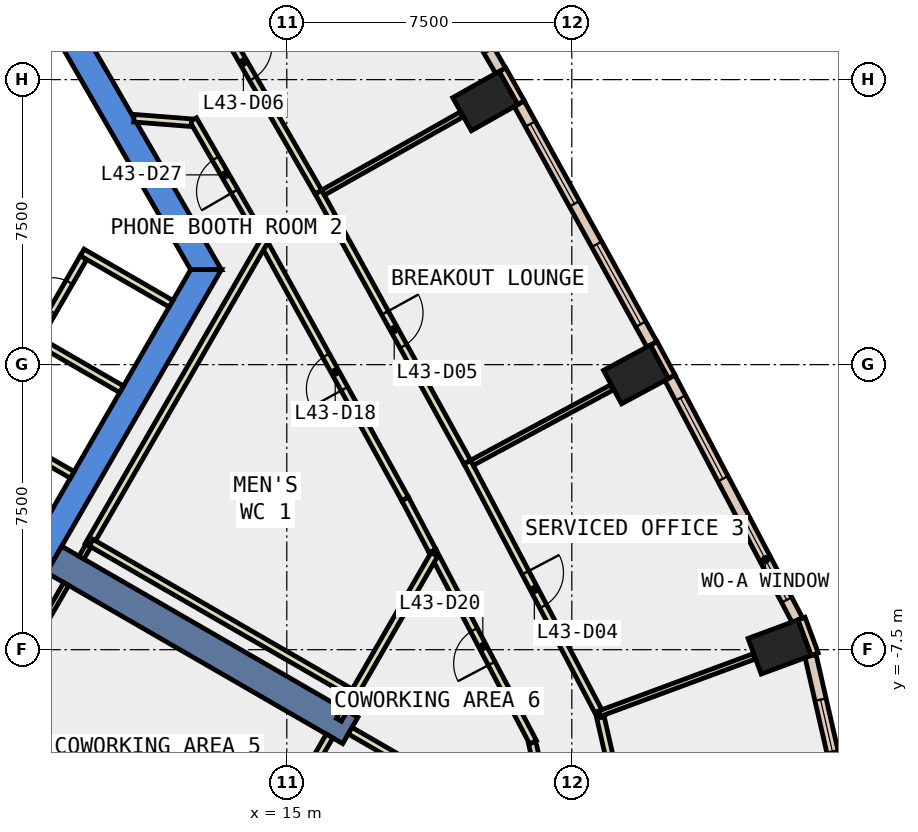
"""IFC4 building model, lengths in metres.
Left out: names, types, materials, properties, quantities, classifications, styles, units other than length and angle.
Written with IfcOpenShell. Run it as: python <this file> out.ifc"""

import sys

from ifc_helpers import new_model, si_unit, direction, frame, frame_2d, origin, origin_2d, place, context, subcontext, project, spatial, polyline, rectangle, outline, extrude, element, fill, save


model = new_model("IFC4")
c1 = context("Model", 3, precision=1e-05, world=origin(), true_north=direction((0.0, 1.0)))
c2 = subcontext(c1, "Body", "Model", "MODEL_VIEW")
j1 = project(units=[si_unit("LENGTHUNIT", "METRE"), si_unit("PLANEANGLEUNIT", "RADIAN")], contexts=[c1])
p1 = place(None, origin())
s1 = spatial("IfcSite", under=j1, at=p1, CompositionType="ELEMENT")
p2 = place(p1, origin())
s2 = spatial("IfcBuilding", under=s1, at=p2, CompositionType="ELEMENT")
p3 = place(p2, frame((0.0, 0.0, 194.0)))
s3 = spatial("IfcBuildingStorey", under=s2, at=p3, CompositionType="ELEMENT", Elevation=194.0)
for number, where, z_axis, x_axis in (
    (1, (27.967, -7.429, -0.4), (0.0, 0.0, 1.0), (-0.347, 0.938, 0.0)),
    (2, (24.188, -0.259, -0.4), (0.0, 0.0, 1.0), (-0.474, 0.88, 0.0)),
    (3, (20.222, 6.934, -0.4), (0.0, 0.0, 1.0), (-0.491, 0.871, 0.0)),
):
    element("IfcColumn", number, at=place(p3, frame(where, z_axis=z_axis, x_axis=x_axis)), inside=s3, PredefinedType="COLUMN", context=c2, shape_type="SweptSolid", body=[
        extrude(rectangle(XDim=1.0, YDim=1.4, at=origin_2d()), origin(), (0.0, 0.0, 1.0), 4.2),
    ])
p4 = place(p3, frame((0.0, 0.0, -0.4)))
e4 = element("IfcWall", 4, at=p4, inside=s3, PredefinedType="SHEAR", context=c2, shape_type="SweptSolid", body=[
    extrude(outline(polyline([(8.084, 11.498), (7.478, 11.148), (12.471, 2.5), (13.279, 2.5), (8.084, 11.498)])), origin(), (0.0, 0.0, 1.0), 4.2),
])
p5 = place(p3, frame((0.0, 0.0, -0.4)))
e5 = element("IfcWall", 5, at=p5, inside=s3, PredefinedType="SHEAR", context=c2, shape_type="SweptSolid", body=[
    extrude(outline(polyline([(6.64, -9.0), (13.279, 2.5), (12.471, 2.5), (6.235, -8.3), (6.64, -9.0)])), origin(), (0.0, 0.0, 1.0), 4.2),
])
p6 = place(p3, frame((8.877, -5.125, -0.4), z_axis=(0.0, 0.0, 1.0), x_axis=(0.866017533419, -0.500013631625, 0.0)))
e6 = element("IfcWall", 6, at=p6, inside=s3, PredefinedType="SHEAR", context=c2, shape_type="SweptSolid", body=[
    extrude(rectangle(XDim=9.0, YDim=0.8, at=frame_2d((4.5, 0.0))), origin(), (0.0, 0.0, 1.0), 4.2),
])
p7 = place(p3, frame((28.891, -7.621, 0.0), z_axis=(0.0, 0.0, 1.0), x_axis=(-0.347107644204, 0.937825294677, 0.0)))
e7 = element("IfcWall", 7, at=p7, inside=s3, PredefinedType="STANDARD", context=c2, shape_type="SweptSolid", body=[
    extrude(rectangle(XDim=1.0, YDim=0.2, at=frame_2d((0.5, 0.0))), origin(), (0.0, 0.0, 1.0), 3.8),
])
p8 = place(p3, frame((25.129, -0.32, 0.0), z_axis=(0.0, 0.0, 1.0), x_axis=(-0.473663196434, 0.88070606694, 0.0)))
e8 = element("IfcWall", 8, at=p8, inside=s3, PredefinedType="STANDARD", context=c2, shape_type="SweptSolid", body=[
    extrude(rectangle(XDim=1.0, YDim=0.2, at=frame_2d((0.5, 0.0))), origin(), (0.0, 0.0, 1.0), 3.8),
])
p9 = place(p3, frame((21.165, 6.891, 0.0), z_axis=(0.0, 0.0, 1.0), x_axis=(-0.491848119507, 0.870681013539, 0.0)))
e9 = element("IfcWall", 9, at=p9, inside=s3, PredefinedType="STANDARD", context=c2, shape_type="SweptSolid", body=[
    extrude(rectangle(XDim=1.0, YDim=0.2, at=frame_2d((0.5, 0.0))), origin(), (0.0, 0.0, 1.0), 3.8),
])
p10 = place(p3, frame((29.621, -11.332, 0.0), z_axis=(0.0, 0.0, 1.0), x_axis=(-0.223013094864, 0.974815448954, 0.0)))
e10 = element("IfcWall", 10, at=p10, inside=s3, PredefinedType="STANDARD", context=c2, shape_type="SweptSolid", body=[
    extrude(rectangle(XDim=3.767, YDim=0.3, at=frame_2d((1.884, 0.0))), origin(), (0.0, 0.0, 1.0), 3.8),
])
p11 = place(p10, frame((1.183, 0.0, 0.9)))
e11 = element("IfcOpeningElement", 11, at=p11, cuts=e10, PredefinedType="OPENING", context=c2, shape_type="SweptSolid", body=[
    extrude(rectangle(XDim=1.4, YDim=2.6, at=frame_2d((0.7, 1.3))), frame((0.0, 0.16, 0.0), z_axis=(0.0, -1.0, 0.0), x_axis=(1.0, 0.0, 0.0)), (0.0, 0.0, 1.0), 0.32),
])
p12 = place(p3, frame((28.435, -6.724, 0.0), z_axis=(0.0, 0.0, 1.0), x_axis=(-0.465478369088, 0.885059256723, 0.0)))
e12 = element("IfcWall", 12, at=p12, inside=s3, PredefinedType="STANDARD", context=c2, shape_type="SweptSolid", body=[
    extrude(rectangle(XDim=7.208, YDim=0.3, at=frame_2d((3.604, 0.0))), origin(), (0.0, 0.0, 1.0), 3.8),
])
p13 = place(p12, frame((0.602, 0.0, 0.9)))
e13 = element("IfcOpeningElement", 13, at=p13, cuts=e12, PredefinedType="OPENING", context=c2, shape_type="SweptSolid", body=[
    extrude(rectangle(XDim=2.4, YDim=2.6, at=frame_2d((1.2, 1.3))), frame((0.0, 0.16, 0.0), z_axis=(0.0, -1.0, 0.0), x_axis=(1.0, 0.0, 0.0)), (0.0, 0.0, 1.0), 0.32),
])
p14 = place(p12, frame((4.206, 0.0, 0.9)))
e14 = element("IfcOpeningElement", 14, at=p14, cuts=e12, PredefinedType="OPENING", context=c2, shape_type="SweptSolid", body=[
    extrude(rectangle(XDim=2.4, YDim=2.6, at=frame_2d((1.2, 1.3))), frame((0.0, 0.16, 0.0), z_axis=(0.0, -1.0, 0.0), x_axis=(1.0, 0.0, 0.0)), (0.0, 0.0, 1.0), 0.32),
])
p15 = place(p3, frame((24.607, 0.534, 0.0), z_axis=(0.0, 0.0, 1.0), x_axis=(-0.482862185961, 0.875696356832, 0.0)))
e15 = element("IfcWall", 15, at=p15, inside=s3, PredefinedType="STANDARD", context=c2, shape_type="SweptSolid", body=[
    extrude(rectangle(XDim=7.23, YDim=0.3, at=frame_2d((3.615, 0.0))), origin(), (0.0, 0.0, 1.0), 3.8),
])
p16 = place(p15, frame((0.607, 0.0, 0.9)))
e16 = element("IfcOpeningElement", 16, at=p16, cuts=e15, PredefinedType="OPENING", context=c2, shape_type="SweptSolid", body=[
    extrude(rectangle(XDim=2.4, YDim=2.6, at=frame_2d((1.2, 1.3))), frame((0.0, 0.16, 0.0), z_axis=(0.0, -1.0, 0.0), x_axis=(1.0, 0.0, 0.0)), (0.0, 0.0, 1.0), 0.32),
])
p17 = place(p15, frame((4.222, 0.0, 0.9)))
e17 = element("IfcOpeningElement", 17, at=p17, cuts=e15, PredefinedType="OPENING", context=c2, shape_type="SweptSolid", body=[
    extrude(rectangle(XDim=2.4, YDim=2.6, at=frame_2d((1.2, 1.3))), frame((0.0, 0.16, 0.0), z_axis=(0.0, -1.0, 0.0), x_axis=(1.0, 0.0, 0.0)), (0.0, 0.0, 1.0), 0.32),
])
p18 = place(p3, frame((20.626, 7.734, 0.0), z_axis=(0.0, 0.0, 1.0), x_axis=(-0.499948481376, 0.866055146033, 0.0)))
e18 = element("IfcWall", 18, at=p18, inside=s3, PredefinedType="STANDARD", context=c2, shape_type="SweptSolid", body=[
    extrude(rectangle(XDim=7.231, YDim=0.3, at=frame_2d((3.615, 0.0))), origin(), (0.0, 0.0, 1.0), 3.8),
])
p19 = place(p18, frame((0.608, 0.0, 0.9)))
e19 = element("IfcOpeningElement", 19, at=p19, cuts=e18, PredefinedType="OPENING", context=c2, shape_type="SweptSolid", body=[
    extrude(rectangle(XDim=2.4, YDim=2.6, at=frame_2d((1.2, 1.3))), frame((0.0, 0.16, 0.0), z_axis=(0.0, -1.0, 0.0), x_axis=(1.0, 0.0, 0.0)), (0.0, 0.0, 1.0), 0.32),
])
p20 = place(p18, frame((4.223, 0.0, 0.9)))
e20 = element("IfcOpeningElement", 20, at=p20, cuts=e18, PredefinedType="OPENING", context=c2, shape_type="SweptSolid", body=[
    extrude(rectangle(XDim=2.4, YDim=2.6, at=frame_2d((1.2, 1.3))), frame((0.0, 0.16, 0.0), z_axis=(0.0, -1.0, 0.0), x_axis=(1.0, 0.0, 0.0)), (0.0, 0.0, 1.0), 0.32),
])
p21 = place(p3, frame((14.213, 3.543, 0.0), z_axis=(0.0, 0.0, 1.0), x_axis=(-0.500182898346, 0.865919781621, 0.0)))
e21 = element("IfcWall", 21, at=p21, inside=s3, PredefinedType="PARTITIONING", context=c2, shape_type="SweptSolid", body=[
    extrude(rectangle(XDim=3.35, YDim=0.2, at=frame_2d((1.675, 0.0))), origin(), (0.0, 0.0, 1.0), 3.8),
])
p22 = place(p21, frame((1.175, 0.0, 0.0)))
e22 = element("IfcOpeningElement", 22, at=p22, cuts=e21, PredefinedType="OPENING", context=c2, shape_type="SweptSolid", body=[
    extrude(rectangle(XDim=1.0, YDim=2.1, at=frame_2d((0.5, 1.05))), frame((0.0, 0.11, 0.0), z_axis=(0.0, -1.0, 0.0), x_axis=(1.0, 0.0, 0.0)), (0.0, 0.0, 1.0), 0.22),
])
p23 = place(p3, frame((12.488, 6.366, 0.0), z_axis=(0.0, 0.0, 1.0), x_axis=(-0.996960771308, 0.077905201835, 0.0)))
e23 = element("IfcWall", 23, at=p23, inside=s3, PredefinedType="PARTITIONING", context=c2, shape_type="SweptSolid", body=[
    extrude(rectangle(XDim=1.514, YDim=0.2, at=frame_2d((0.757, 0.0))), origin(), (0.0, 0.0, 1.0), 3.8),
])
p24 = place(p3, frame((18.836, -4.906, 0.0), z_axis=(0.0, 0.0, 1.0), x_axis=(-0.465843561357, 0.884867095299, 0.0)))
e24 = element("IfcWall", 24, at=p24, inside=s3, PredefinedType="PARTITIONING", context=c2, shape_type="SweptSolid", body=[
    extrude(rectangle(XDim=1.554, YDim=0.2, at=frame_2d((0.777, 0.0))), origin(), (0.0, 0.0, 1.0), 3.8),
])
p25 = place(p3, frame((18.112, -3.531, 0.0), z_axis=(0.0, 0.0, 1.0), x_axis=(-0.482800061144, 0.875730609811, 0.0)))
e25 = element("IfcWall", 25, at=p25, inside=s3, PredefinedType="PARTITIONING", context=c2, shape_type="SweptSolid", body=[
    extrude(rectangle(XDim=7.612, YDim=0.2, at=frame_2d((3.806, 0.0))), origin(), (0.0, 0.0, 1.0), 3.8),
])
p26 = place(p25, frame((3.306, 0.0, 0.0)))
e26 = element("IfcOpeningElement", 26, at=p26, cuts=e25, PredefinedType="OPENING", context=c2, shape_type="SweptSolid", body=[
    extrude(rectangle(XDim=1.0, YDim=2.1, at=frame_2d((0.5, 1.05))), frame((0.0, 0.11, 0.0), z_axis=(0.0, -1.0, 0.0), x_axis=(1.0, 0.0, 0.0)), (0.0, 0.0, 1.0), 0.22),
])
p27 = place(p3, frame((21.866, -11.737, 0.0), z_axis=(0.0, 0.0, 1.0), x_axis=(-0.222871656966, 0.974847795567, 0.0)))
e27 = element("IfcWall", 27, at=p27, inside=s3, PredefinedType="PARTITIONING", context=c2, shape_type="SweptSolid", body=[
    extrude(rectangle(XDim=1.839, YDim=0.2, at=frame_2d((0.919, 0.0))), origin(), (0.0, 0.0, 1.0), 3.8),
])
p28 = place(p3, frame((21.48, -9.935, 0.0), z_axis=(0.0, 0.0, 1.0), x_axis=(-0.465356775138, 0.885123195851, 0.0)))
e28 = element("IfcWall", 28, at=p28, inside=s3, PredefinedType="PARTITIONING", context=c2, shape_type="SweptSolid", body=[
    extrude(rectangle(XDim=5.682, YDim=0.2, at=frame_2d((2.841, 0.0))), origin(), (0.0, 0.0, 1.0), 3.8),
])
p29 = place(p28, frame((2.341, 0.0, 0.0)))
e29 = element("IfcOpeningElement", 29, at=p29, cuts=e28, PredefinedType="OPENING", context=c2, shape_type="SweptSolid", body=[
    extrude(rectangle(XDim=1.0, YDim=2.1, at=frame_2d((0.5, 1.05))), frame((0.0, 0.11, 0.0), z_axis=(0.0, -1.0, 0.0), x_axis=(1.0, 0.0, 0.0)), (0.0, 0.0, 1.0), 0.22),
])
p30 = place(p3, frame((23.253, -9.279, 0.0), z_axis=(0.0, 0.0, 1.0), x_axis=(0.222909903746, -0.974839050722, 0.0)))
e30 = element("IfcWall", 30, at=p30, inside=s3, PredefinedType="PARTITIONING", context=c2, shape_type="SweptSolid", body=[
    extrude(rectangle(XDim=2.571, YDim=0.2, at=frame_2d((1.285, 0.0))), origin(), (0.0, 0.0, 1.0), 3.8),
])
p31 = place(p3, frame((19.75, -2.563, 0.0), z_axis=(0.0, 0.0, 1.0), x_axis=(0.465444987791, -0.885076812113, 0.0)))
e31 = element("IfcWall", 31, at=p31, inside=s3, PredefinedType="PARTITIONING", context=c2, shape_type="SweptSolid", body=[
    extrude(rectangle(XDim=7.578, YDim=0.2, at=frame_2d((3.789, 0.0))), origin(), (0.0, 0.0, 1.0), 3.8),
])
p32 = place(p31, frame((3.289, 0.0, 0.0)))
e32 = element("IfcOpeningElement", 32, at=p32, cuts=e31, PredefinedType="OPENING", context=c2, shape_type="SweptSolid", body=[
    extrude(rectangle(XDim=1.0, YDim=2.1, at=frame_2d((0.5, 1.05))), frame((0.0, 0.11, 0.0), z_axis=(0.0, -1.0, 0.0), x_axis=(1.0, 0.0, 0.0)), (0.0, 0.0, 1.0), 0.22),
])
p33 = place(p3, frame((15.831, 4.542, 0.0), z_axis=(0.0, 0.0, 1.0), x_axis=(0.482835531749, -0.875711053533, 0.0)))
e33 = element("IfcWall", 33, at=p33, inside=s3, PredefinedType="PARTITIONING", context=c2, shape_type="SweptSolid", body=[
    extrude(rectangle(XDim=8.115, YDim=0.2, at=frame_2d((4.057, 0.0))), origin(), (0.0, 0.0, 1.0), 3.8),
])
p34 = place(p33, frame((3.632, 0.0, 0.0)))
e34 = element("IfcOpeningElement", 34, at=p34, cuts=e33, PredefinedType="OPENING", context=c2, shape_type="SweptSolid", body=[
    extrude(rectangle(XDim=1.0, YDim=2.1, at=frame_2d((0.5, 1.05))), frame((0.0, 0.11, 0.0), z_axis=(0.0, -1.0, 0.0), x_axis=(1.0, 0.0, 0.0)), (0.0, 0.0, 1.0), 0.22),
])
p35 = place(p3, frame((11.811, 11.503, 0.0), z_axis=(0.0, 0.0, 1.0), x_axis=(0.500013420409, -0.866017655369, 0.0)))
e35 = element("IfcWall", 35, at=p35, inside=s3, PredefinedType="PARTITIONING", context=c2, shape_type="SweptSolid", body=[
    extrude(rectangle(XDim=8.038, YDim=0.2, at=frame_2d((4.019, 0.0))), origin(), (0.0, 0.0, 1.0), 3.8),
])
p36 = place(p35, frame((3.594, 0.0, 0.0)))
e36 = element("IfcOpeningElement", 36, at=p36, cuts=e35, PredefinedType="OPENING", context=c2, shape_type="SweptSolid", body=[
    extrude(rectangle(XDim=1.0, YDim=2.1, at=frame_2d((0.5, 1.05))), frame((0.0, 0.11, 0.0), z_axis=(0.0, -1.0, 0.0), x_axis=(1.0, 0.0, 0.0)), (0.0, 0.0, 1.0), 0.22),
])
p37 = place(p3, frame((7.188, -1.65, 0.0), z_axis=(0.0, 0.0, 1.0), x_axis=(0.866022959057, -0.500004234368, 0.0)))
e37 = element("IfcWall", 37, at=p37, inside=s3, PredefinedType="PARTITIONING", context=c2, shape_type="SweptSolid", body=[
    extrude(rectangle(XDim=2.5, YDim=0.2, at=frame_2d((1.25, 0.0))), origin(), (0.0, 0.0, 1.0), 3.8),
])
p38 = place(p37, frame((0.75, 0.0, 0.0)))
e38 = element("IfcOpeningElement", 38, at=p38, cuts=e37, PredefinedType="OPENING", context=c2, shape_type="SweptSolid", body=[
    extrude(rectangle(XDim=0.9, YDim=2.1, at=frame_2d((0.45, 1.05))), frame((0.0, 0.11, 0.0), z_axis=(0.0, -1.0, 0.0), x_axis=(1.0, 0.0, 0.0)), (0.0, 0.0, 1.0), 0.22),
])
p39 = place(p3, frame((10.653, -0.648, 0.0), z_axis=(0.0, 0.0, 1.0), x_axis=(-0.866036505625, 0.499980770555, 0.0)))
e39 = element("IfcWall", 39, at=p39, inside=s3, PredefinedType="PARTITIONING", context=c2, shape_type="SweptSolid", body=[
    extrude(rectangle(XDim=2.7, YDim=0.2, at=frame_2d((1.35, 0.0))), origin(), (0.0, 0.0, 1.0), 3.8),
])
p40 = place(p3, frame((8.451, 0.738, 0.0), z_axis=(0.0, 0.0, 1.0), x_axis=(0.499913221443, 0.866075499611, 0.0)))
e40 = element("IfcWall", 40, at=p40, inside=s3, PredefinedType="PARTITIONING", context=c2, shape_type="SweptSolid", body=[
    extrude(rectangle(XDim=2.4, YDim=0.2, at=frame_2d((1.2, 0.0))), origin(), (0.0, 0.0, 1.0), 3.8),
])
p41 = place(p40, frame((0.75, 0.0, 0.0)))
e41 = element("IfcOpeningElement", 41, at=p41, cuts=e40, PredefinedType="OPENING", context=c2, shape_type="SweptSolid", body=[
    extrude(rectangle(XDim=0.9, YDim=2.1, at=frame_2d((0.45, 1.05))), frame((0.0, 0.11, 0.0), z_axis=(0.0, -1.0, 0.0), x_axis=(1.0, 0.0, 0.0)), (0.0, 0.0, 1.0), 0.22),
])
p42 = place(p3, frame((9.615, 2.953, 0.0), z_axis=(0.0, 0.0, 1.0), x_axis=(0.866013897511, -0.50001992892, 0.0)))
e42 = element("IfcWall", 42, at=p42, inside=s3, PredefinedType="PARTITIONING", context=c2, shape_type="SweptSolid", body=[
    extrude(rectangle(XDim=2.7, YDim=0.2, at=frame_2d((1.35, 0.0))), origin(), (0.0, 0.0, 1.0), 3.8),
])
p43 = place(p3, frame((7.283, -9.086, 0.0), z_axis=(0.0, 0.0, 1.0), x_axis=(0.499843936326, 0.866115488442, 0.0)))
e43 = element("IfcWall", 43, at=p43, inside=s3, PredefinedType="PARTITIONING", context=c2, shape_type="SweptSolid", body=[
    extrude(rectangle(XDim=3.827, YDim=0.15, at=frame_2d((1.914, 0.0))), origin(), (0.0, 0.0, 1.0), 3.8),
])
p44 = place(p3, frame((9.781, -4.758, 0.0), z_axis=(0.0, 0.0, 1.0), x_axis=(0.50003174578, 0.866007074574, 0.0)))
e44 = element("IfcWall", 44, at=p44, inside=s3, PredefinedType="PARTITIONING", context=c2, shape_type="SweptSolid", body=[
    extrude(rectangle(XDim=9.315, YDim=0.2, at=frame_2d((4.658, 0.0))), origin(), (0.0, 0.0, 1.0), 3.8),
])
p45 = place(p3, frame((9.853, -4.684, 0.0), z_axis=(0.0, 0.0, 1.0), x_axis=(0.865999791918, -0.500044358431, 0.0)))
e45 = element("IfcWall", 45, at=p45, inside=s3, PredefinedType="PARTITIONING", context=c2, shape_type="SweptSolid", body=[
    extrude(rectangle(XDim=8.075, YDim=0.2, at=frame_2d((4.038, 0.0))), origin(), (0.0, 0.0, 1.0), 3.8),
])
p46 = place(p3, frame((16.125, -9.771, 0.0), z_axis=(0.0, 0.0, 1.0), x_axis=(-0.500030759312, -0.866007644159, 0.0)))
e46 = element("IfcWall", 46, at=p46, inside=s3, PredefinedType="PARTITIONING", context=c2, shape_type="SweptSolid", body=[
    extrude(rectangle(XDim=4.73, YDim=0.2, at=frame_2d((2.365, 0.0))), origin(), (0.0, 0.0, 1.0), 3.8),
])
p47 = place(p3, frame((16.71, -8.758, 0.0), z_axis=(0.0, 0.0, 1.0), x_axis=(-0.500013496215, -0.866017611601, 0.0)))
e47 = element("IfcWall", 47, at=p47, inside=s3, PredefinedType="PARTITIONING", context=c2, shape_type="SweptSolid", body=[
    extrude(rectangle(XDim=0.678, YDim=0.15, at=frame_2d((0.339, 0.0))), origin(), (0.0, 0.0, 1.0), 3.8),
])
p48 = place(p3, frame((18.882, -4.995, 0.0), z_axis=(0.0, 0.0, 1.0), x_axis=(-0.499895813511, -0.866085547527, 0.0)))
e48 = element("IfcWall", 48, at=p48, inside=s3, PredefinedType="PARTITIONING", context=c2, shape_type="SweptSolid", body=[
    extrude(rectangle(XDim=4.145, YDim=0.2, at=frame_2d((2.073, 0.0))), origin(), (0.0, 0.0, 1.0), 3.8),
])
p49 = place(p3, frame((16.667, -9.631, 0.0), z_axis=(0.0, 0.0, 1.0), x_axis=(0.866032775405, -0.499987231761, 0.0)))
e49 = element("IfcWall", 49, at=p49, inside=s3, PredefinedType="PARTITIONING", context=c2, shape_type="SweptSolid", body=[
    extrude(rectangle(XDim=5.8, YDim=0.2, at=frame_2d((2.9, 0.0))), origin(), (0.0, 0.0, 1.0), 3.8),
])
p50 = place(p3, frame((23.231, -9.182, 0.0), z_axis=(0.0, 0.0, 1.0), x_axis=(0.937835784628, 0.34707930084, 0.0)))
e50 = element("IfcWall", 50, at=p50, inside=s3, PredefinedType="PARTITIONING", context=c2, shape_type="SweptSolid", body=[
    extrude(rectangle(XDim=4.33, YDim=0.15, at=frame_2d((2.165, 0.0))), origin(), (0.0, 0.0, 1.0), 3.8),
])
p51 = place(p3, frame((19.873, -2.582, 0.0), z_axis=(0.0, 0.0, 1.0), x_axis=(0.880480475723, 0.474082410421, 0.0)))
e51 = element("IfcWall", 51, at=p51, inside=s3, PredefinedType="PARTITIONING", context=c2, shape_type="SweptSolid", body=[
    extrude(rectangle(XDim=4.181, YDim=0.15, at=frame_2d((2.09, 0.0))), origin(), (0.0, 0.0, 1.0), 3.8),
])
p52 = place(p3, frame((15.954, 4.526, 0.0), z_axis=(0.0, 0.0, 1.0), x_axis=(0.870940016277, 0.491389344663, 0.0)))
e52 = element("IfcWall", 52, at=p52, inside=s3, PredefinedType="PARTITIONING", context=c2, shape_type="SweptSolid", body=[
    extrude(rectangle(XDim=4.18, YDim=0.15, at=frame_2d((2.09, 0.0))), origin(), (0.0, 0.0, 1.0), 3.8),
])
p53 = place(p3, frame((9.596, -5.078, 0.0), z_axis=(0.0, 0.0, 1.0), x_axis=(0.500827895298, 0.86554689029, 0.0)))
e53 = element("IfcWall", 53, at=p53, inside=s3, PredefinedType="PARTITIONING", context=c2, shape_type="SweptSolid", body=[
    extrude(rectangle(XDim=0.369, YDim=0.15, at=frame_2d((0.185, 0.0))), origin(), (0.0, 0.0, 1.0), 3.8),
])
p54 = place(p11, origin())
e54 = element("IfcWindow", 54, at=p54, inside=s3, PartitioningType="SINGLE_PANEL", PredefinedType="WINDOW", context=c2, shape_type="SweptSolid", body=[
    extrude(rectangle(XDim=1.4, YDim=2.6, at=frame_2d((0.7, 1.3))), frame((0.0, 0.03, 0.0), z_axis=(0.0, -1.0, 0.0), x_axis=(1.0, 0.0, 0.0)), (0.0, 0.0, 1.0), 0.06),
])
fill(e11, e54)
p55 = place(p13, origin())
e55 = element("IfcWindow", 55, at=p55, inside=s3, PartitioningType="SINGLE_PANEL", PredefinedType="WINDOW", context=c2, shape_type="SweptSolid", body=[
    extrude(rectangle(XDim=2.4, YDim=2.6, at=frame_2d((1.2, 1.3))), frame((0.0, 0.03, 0.0), z_axis=(0.0, -1.0, 0.0), x_axis=(1.0, 0.0, 0.0)), (0.0, 0.0, 1.0), 0.06),
])
fill(e13, e55)
p56 = place(p14, origin())
e56 = element("IfcWindow", 56, at=p56, inside=s3, PartitioningType="SINGLE_PANEL", PredefinedType="WINDOW", context=c2, shape_type="SweptSolid", body=[
    extrude(rectangle(XDim=2.4, YDim=2.6, at=frame_2d((1.2, 1.3))), frame((0.0, 0.03, 0.0), z_axis=(0.0, -1.0, 0.0), x_axis=(1.0, 0.0, 0.0)), (0.0, 0.0, 1.0), 0.06),
])
fill(e14, e56)
p57 = place(p16, origin())
e57 = element("IfcWindow", 57, at=p57, inside=s3, PartitioningType="SINGLE_PANEL", PredefinedType="WINDOW", context=c2, shape_type="SweptSolid", body=[
    extrude(rectangle(XDim=2.4, YDim=2.6, at=frame_2d((1.2, 1.3))), frame((0.0, 0.03, 0.0), z_axis=(0.0, -1.0, 0.0), x_axis=(1.0, 0.0, 0.0)), (0.0, 0.0, 1.0), 0.06),
])
fill(e16, e57)
p58 = place(p17, origin())
e58 = element("IfcWindow", 58, at=p58, inside=s3, PartitioningType="SINGLE_PANEL", PredefinedType="WINDOW", context=c2, shape_type="SweptSolid", body=[
    extrude(rectangle(XDim=2.4, YDim=2.6, at=frame_2d((1.2, 1.3))), frame((0.0, 0.03, 0.0), z_axis=(0.0, -1.0, 0.0), x_axis=(1.0, 0.0, 0.0)), (0.0, 0.0, 1.0), 0.06),
])
fill(e17, e58)
p59 = place(p32, origin())
e59 = element("IfcDoor", 59, at=p59, inside=s3, OperationType="SINGLE_SWING_LEFT", PredefinedType="DOOR", context=c2, shape_type="SweptSolid", body=[
    extrude(rectangle(XDim=1.0, YDim=2.1, at=frame_2d((0.5, 1.05))), frame((0.0, 0.025, 0.0), z_axis=(0.0, -1.0, 0.0), x_axis=(1.0, 0.0, 0.0)), (0.0, 0.0, 1.0), 0.05),
])
fill(e32, e59)
p60 = place(p34, origin())
e60 = element("IfcDoor", 60, at=p60, inside=s3, OperationType="SINGLE_SWING_RIGHT", PredefinedType="DOOR", context=c2, shape_type="SweptSolid", body=[
    extrude(rectangle(XDim=1.0, YDim=2.1, at=frame_2d((0.5, 1.05))), frame((0.0, 0.025, 0.0), z_axis=(0.0, -1.0, 0.0), x_axis=(1.0, 0.0, 0.0)), (0.0, 0.0, 1.0), 0.05),
])
fill(e34, e60)
p61 = place(p36, origin())
e61 = element("IfcDoor", 61, at=p61, inside=s3, OperationType="SINGLE_SWING_LEFT", PredefinedType="DOOR", context=c2, shape_type="SweptSolid", body=[
    extrude(rectangle(XDim=1.0, YDim=2.1, at=frame_2d((0.5, 1.05))), frame((0.0, 0.025, 0.0), z_axis=(0.0, -1.0, 0.0), x_axis=(1.0, 0.0, 0.0)), (0.0, 0.0, 1.0), 0.05),
])
fill(e36, e61)
p62 = place(p26, origin())
e62 = element("IfcDoor", 62, at=p62, inside=s3, OperationType="SINGLE_SWING_LEFT", PredefinedType="DOOR", context=c2, shape_type="SweptSolid", body=[
    extrude(rectangle(XDim=1.0, YDim=2.1, at=frame_2d((0.5, 1.05))), frame((0.0, 0.025, 0.0), z_axis=(0.0, -1.0, 0.0), x_axis=(1.0, 0.0, 0.0)), (0.0, 0.0, 1.0), 0.05),
])
fill(e26, e62)
p63 = place(p29, origin())
e63 = element("IfcDoor", 63, at=p63, inside=s3, OperationType="SINGLE_SWING_LEFT", PredefinedType="DOOR", context=c2, shape_type="SweptSolid", body=[
    extrude(rectangle(XDim=1.0, YDim=2.1, at=frame_2d((0.5, 1.05))), frame((0.0, 0.025, 0.0), z_axis=(0.0, -1.0, 0.0), x_axis=(1.0, 0.0, 0.0)), (0.0, 0.0, 1.0), 0.05),
])
fill(e29, e63)
p64 = place(p22, origin())
e64 = element("IfcDoor", 64, at=p64, inside=s3, OperationType="SINGLE_SWING_LEFT", PredefinedType="DOOR", context=c2, shape_type="SweptSolid", body=[
    extrude(rectangle(XDim=1.0, YDim=2.1, at=frame_2d((0.5, 1.05))), frame((0.0, 0.025, 0.0), z_axis=(0.0, -1.0, 0.0), x_axis=(1.0, 0.0, 0.0)), (0.0, 0.0, 1.0), 0.05),
])
fill(e22, e64)
p65 = place(p41, origin())
e65 = element("IfcDoor", 65, at=p65, inside=s3, OperationType="SINGLE_SWING_LEFT", PredefinedType="DOOR", context=c2, shape_type="SweptSolid", body=[
    extrude(rectangle(XDim=0.9, YDim=2.1, at=frame_2d((0.45, 1.05))), frame((0.0, 0.025, 0.0), z_axis=(0.0, -1.0, 0.0), x_axis=(1.0, 0.0, 0.0)), (0.0, 0.0, 1.0), 0.05),
])
fill(e41, e65)
save(model, sys.argv[1])
